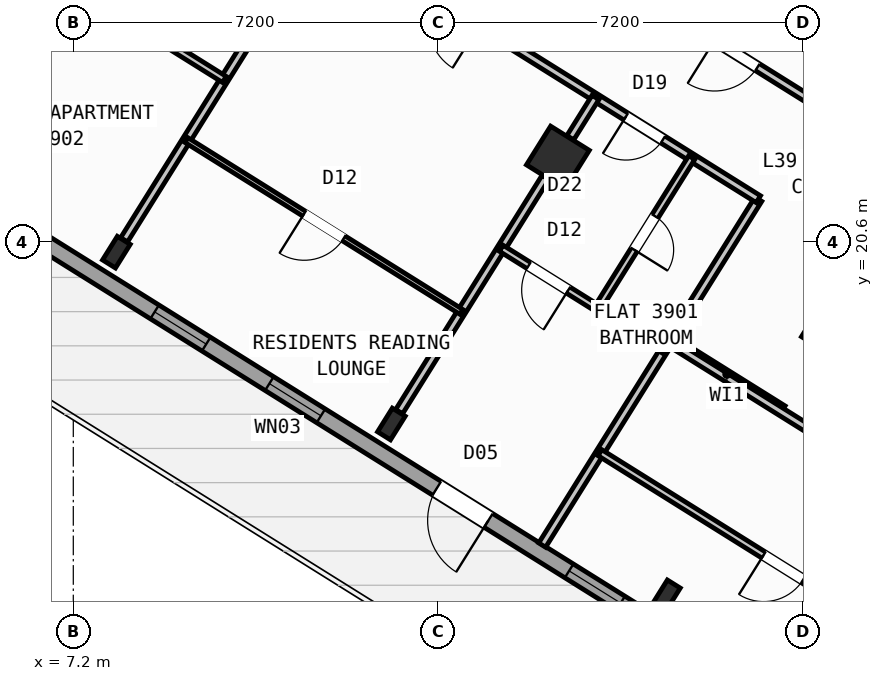
"""IFC4 building model, lengths in metres.
Left out: names, types, materials, properties, quantities, classifications, styles, units other than length and angle.
Written with IfcOpenShell. Run it as: python <this file> out.ifc"""

import sys

from ifc_helpers import new_model, si_unit, direction, frame, frame_2d, origin, origin_2d, place, context, subcontext, project, spatial, rectangle, hollow_rectangle, i_section, extrude, source, transform, mapped, element, fill, save


model = new_model("IFC4")
c1 = context("Model", 3, precision=1e-05, world=origin(), true_north=direction((0.0, 1.0)))
c2 = subcontext(c1, "Body", "Model", "MODEL_VIEW")
j1 = project(units=[si_unit("LENGTHUNIT", "METRE"), si_unit("PLANEANGLEUNIT", "RADIAN")], contexts=[c1])
p1 = place(None, origin())
s1 = spatial("IfcSite", under=j1, at=p1, CompositionType="ELEMENT")
p2 = place(p1, origin())
s2 = spatial("IfcBuilding", under=s1, at=p2, CompositionType="ELEMENT")
p3 = place(p2, frame((0.0, 0.0, 155.1)))
s3 = spatial("IfcBuildingStorey", under=s2, at=p3, CompositionType="ELEMENT", Elevation=155.1)
m1 = source(origin(), c2, "Body", "SweptSolid", [
    extrude(hollow_rectangle(XDim=0.9, YDim=0.9, WallThickness=0.036, at=origin_2d()), origin(), (0.0, 0.0, 1.0), 3.6),
])
p4 = place(p3, frame((22.191, 18.87, 0.0), z_axis=(0.0, 0.0, 1.0), x_axis=(-0.848048096156, 0.529919264233, 0.0)))
e1 = element("IfcColumn", 1, at=p4, inside=s3, PredefinedType="COLUMN", context=c2, shape_type="MappedRepresentation", body=[
    mapped(m1, transform((0.0, 0.0, 0.0), scale=1.0)),
])
m2 = source(origin(), c2, "Body", "SweptSolid", [
    extrude(i_section(OverallWidth=0.3, OverallDepth=0.55, WebThickness=0.015, FlangeThickness=0.029, at=origin_2d()), origin(), (0.0, 0.0, 1.0), 3.6),
])
p5 = place(p3, frame((18.906, 13.612, 0.0), z_axis=(0.0, 0.0, 1.0), x_axis=(-0.848048096156, 0.529919264233, 0.0)))
e2 = element("IfcColumn", 2, at=p5, inside=s3, PredefinedType="COLUMN", context=c2, shape_type="MappedRepresentation", body=[
    mapped(m2, transform((0.0, 0.0, 0.0), scale=1.0)),
])
p6 = place(p3, frame((16.764, 22.261, 0.0), z_axis=(0.0, 0.0, 1.0), x_axis=(-0.848048096156, 0.529919264233, 0.0)))
e3 = element("IfcColumn", 3, at=p6, inside=s3, PredefinedType="COLUMN", context=c2, shape_type="MappedRepresentation", body=[
    mapped(m1, transform((0.0, 0.0, 0.0), scale=1.0)),
])
for number, where, z_axis, x_axis in (
    (4, (13.478, 17.003, 0.0), (0.0, 0.0, 1.0), (-0.848, 0.53, 0.0)),
    (5, (8.051, 20.395, 0.0), (0.0, 0.0, 1.0), (-0.848, 0.53, 0.0)),
):
    element("IfcColumn", number, at=place(p3, frame(where, z_axis=z_axis, x_axis=x_axis)), inside=s3, PredefinedType="COLUMN", context=c2, shape_type="MappedRepresentation", body=[
        mapped(m2, transform((0.0, 0.0, 0.0), scale=1.0)),
    ])
p7 = place(p3, frame((29.268, 6.429, 0.0), z_axis=(0.0, 0.0, 1.0), x_axis=(-0.848049971435, 0.529916263149, 0.0)))
e6 = element("IfcWall", 6, at=p7, inside=s3, PredefinedType="STANDARD", context=c2, shape_type="SweptSolid", body=[
    extrude(rectangle(XDim=31.588, YDim=0.32, at=frame_2d((15.794, 0.0))), origin(), (0.0, 0.0, 1.0), 3.35),
])
p8 = place(p7, frame((16.362, 0.0, 0.0)))
e7 = element("IfcOpeningElement", 7, at=p8, cuts=e6, PredefinedType="OPENING", context=c2, shape_type="SweptSolid", body=[
    extrude(rectangle(XDim=1.2, YDim=2.15, at=frame_2d((0.6, 1.075))), frame((0.0, 0.17, 0.0), z_axis=(0.0, -1.0, 0.0), x_axis=(1.0, 0.0, 0.0)), (0.0, 0.0, 1.0), 0.34),
])
p9 = place(p7, frame((2.989, 0.0, 0.8)))
e8 = element("IfcOpeningElement", 8, at=p9, cuts=e6, PredefinedType="OPENING", context=c2, shape_type="SweptSolid", body=[
    extrude(rectangle(XDim=2.1, YDim=1.55, at=frame_2d((1.05, 0.775))), frame((0.0, 0.17, 0.0), z_axis=(0.0, -1.0, 0.0), x_axis=(1.0, 0.0, 0.0)), (0.0, 0.0, 1.0), 0.34),
])
p10 = place(p7, frame((8.359, 0.0, 0.8)))
e9 = element("IfcOpeningElement", 9, at=p10, cuts=e6, PredefinedType="OPENING", context=c2, shape_type="SweptSolid", body=[
    extrude(rectangle(XDim=2.1, YDim=1.55, at=frame_2d((1.05, 0.775))), frame((0.0, 0.17, 0.0), z_axis=(0.0, -1.0, 0.0), x_axis=(1.0, 0.0, 0.0)), (0.0, 0.0, 1.0), 0.34),
])
p11 = place(p7, frame((13.284, 0.0, 0.95)))
e10 = element("IfcOpeningElement", 10, at=p11, cuts=e6, PredefinedType="OPENING", context=c2, shape_type="SweptSolid", body=[
    extrude(rectangle(XDim=1.2, YDim=1.4, at=frame_2d((0.6, 0.7))), frame((0.0, 0.17, 0.0), z_axis=(0.0, -1.0, 0.0), x_axis=(1.0, 0.0, 0.0)), (0.0, 0.0, 1.0), 0.34),
])
p12 = place(p7, frame((20.259, 0.0, 0.95)))
e11 = element("IfcOpeningElement", 11, at=p12, cuts=e6, PredefinedType="OPENING", context=c2, shape_type="SweptSolid", body=[
    extrude(rectangle(XDim=1.2, YDim=1.4, at=frame_2d((0.6, 0.7))), frame((0.0, 0.17, 0.0), z_axis=(0.0, -1.0, 0.0), x_axis=(1.0, 0.0, 0.0)), (0.0, 0.0, 1.0), 0.34),
])
p13 = place(p7, frame((22.929, 0.0, 0.95)))
e12 = element("IfcOpeningElement", 12, at=p13, cuts=e6, PredefinedType="OPENING", context=c2, shape_type="SweptSolid", body=[
    extrude(rectangle(XDim=1.2, YDim=1.4, at=frame_2d((0.6, 0.7))), frame((0.0, 0.17, 0.0), z_axis=(0.0, -1.0, 0.0), x_axis=(1.0, 0.0, 0.0)), (0.0, 0.0, 1.0), 0.34),
])
p14 = place(p7, frame((27.481, 0.0, 0.8)))
e13 = element("IfcOpeningElement", 13, at=p14, cuts=e6, PredefinedType="OPENING", context=c2, shape_type="SweptSolid", body=[
    extrude(rectangle(XDim=2.1, YDim=1.55, at=frame_2d((1.05, 0.775))), frame((0.0, 0.17, 0.0), z_axis=(0.0, -1.0, 0.0), x_axis=(1.0, 0.0, 0.0)), (0.0, 0.0, 1.0), 0.34),
])
p15 = place(p3, frame((2.415, 23.452, 0.0), z_axis=(0.0, 0.0, 1.0), x_axis=(0.52991049553, 0.848053575387, 0.0)))
e14 = element("IfcWall", 14, at=p15, inside=s3, PredefinedType="STANDARD", context=c2, shape_type="SweptSolid", body=[
    extrude(rectangle(XDim=21.587, YDim=0.32, at=frame_2d((10.794, 0.0))), origin(), (0.0, 0.0, 1.0), 2.775),
])
p16 = place(p15, frame((1.406, 0.0, 0.8)))
e15 = element("IfcOpeningElement", 15, at=p16, cuts=e14, PredefinedType="OPENING", context=c2, shape_type="SweptSolid", body=[
    extrude(rectangle(XDim=2.1, YDim=1.55, at=frame_2d((1.05, 0.775))), frame((0.0, 0.17, 0.0), z_axis=(0.0, -1.0, 0.0), x_axis=(1.0, 0.0, 0.0)), (0.0, 0.0, 1.0), 0.34),
])
p17 = place(p15, frame((10.949, 0.0, 1.0)))
e16 = element("IfcOpeningElement", 16, at=p17, cuts=e14, PredefinedType="OPENING", context=c2, shape_type="SweptSolid", body=[
    extrude(rectangle(XDim=0.9, YDim=1.25, at=frame_2d((0.45, 0.625))), frame((0.0, 0.17, 0.0), z_axis=(0.0, -1.0, 0.0), x_axis=(1.0, 0.0, 0.0)), (0.0, 0.0, 1.0), 0.34),
])
p18 = place(p15, frame((15.369, 0.0, 0.85)))
e17 = element("IfcOpeningElement", 17, at=p18, cuts=e14, PredefinedType="OPENING", context=c2, shape_type="SweptSolid", body=[
    extrude(rectangle(XDim=1.5, YDim=1.5, at=frame_2d((0.75, 0.75))), frame((0.0, 0.17, 0.0), z_axis=(0.0, -1.0, 0.0), x_axis=(1.0, 0.0, 0.0)), (0.0, 0.0, 1.0), 0.34),
])
p19 = place(p15, frame((18.219, 0.0, 0.85)))
e18 = element("IfcOpeningElement", 18, at=p19, cuts=e14, PredefinedType="OPENING", context=c2, shape_type="SweptSolid", body=[
    extrude(rectangle(XDim=1.5, YDim=1.5, at=frame_2d((0.75, 0.75))), frame((0.0, 0.17, 0.0), z_axis=(0.0, -1.0, 0.0), x_axis=(1.0, 0.0, 0.0)), (0.0, 0.0, 1.0), 0.34),
])
p20 = place(p3, frame((21.206, 17.292, 0.0), z_axis=(0.0, 0.0, 1.0), x_axis=(-0.848050851465, 0.529914854792, 0.0)))
e19 = element("IfcWall", 19, at=p20, inside=s3, PredefinedType="PARTITIONING", context=c2, shape_type="SweptSolid", body=[
    extrude(rectangle(XDim=2.61, YDim=0.16, at=frame_2d((1.305, 0.0))), origin(), (0.0, 0.0, 1.0), 3.34),
])
p21 = place(p3, frame((20.719, 21.44, 0.0), z_axis=(0.0, 0.0, 1.0), x_axis=(-0.529906246318, -0.848056230514, 0.0)))
e20 = element("IfcWall", 20, at=p21, inside=s3, PredefinedType="PARTITIONING", context=c2, shape_type="SweptSolid", body=[
    extrude(rectangle(XDim=8.05, YDim=0.16, at=frame_2d((4.025, 0.0))), origin(), (0.0, 0.0, 1.0), 3.34),
])
p22 = place(p3, frame((21.885, 23.306, 0.0), z_axis=(0.0, 0.0, 1.0), x_axis=(-0.848052408131, 0.529912363569, 0.0)))
e21 = element("IfcWall", 21, at=p22, inside=s3, PredefinedType="PARTITIONING", context=c2, shape_type="SweptSolid", body=[
    extrude(rectangle(XDim=16.73, YDim=0.16, at=frame_2d((8.365, 0.0))), origin(), (0.0, 0.0, 1.0), 3.34),
])
p23 = place(p22, frame((1.395, 0.0, 0.0)))
e22 = element("IfcOpeningElement", 22, at=p23, cuts=e21, PredefinedType="OPENING", context=c2, shape_type="SweptSolid", body=[
    extrude(rectangle(XDim=1.0, YDim=2.1, at=frame_2d((0.5, 1.05))), frame((0.0, 0.09, 0.0), z_axis=(0.0, -1.0, 0.0), x_axis=(1.0, 0.0, 0.0)), (0.0, 0.0, 1.0), 0.18),
])
p24 = place(p22, frame((7.82, 0.0, 0.0)))
e23 = element("IfcOpeningElement", 23, at=p24, cuts=e21, PredefinedType="OPENING", context=c2, shape_type="SweptSolid", body=[
    extrude(rectangle(XDim=1.0, YDim=2.1, at=frame_2d((0.5, 1.05))), frame((0.0, 0.09, 0.0), z_axis=(0.0, -1.0, 0.0), x_axis=(1.0, 0.0, 0.0)), (0.0, 0.0, 1.0), 0.18),
])
p25 = place(p22, frame((11.14, 0.0, 0.0)))
e24 = element("IfcOpeningElement", 24, at=p25, cuts=e21, PredefinedType="OPENING", context=c2, shape_type="SweptSolid", body=[
    extrude(rectangle(XDim=1.0, YDim=2.1, at=frame_2d((0.5, 1.05))), frame((0.0, 0.09, 0.0), z_axis=(0.0, -1.0, 0.0), x_axis=(1.0, 0.0, 0.0)), (0.0, 0.0, 1.0), 0.18),
])
p26 = place(p3, frame((20.719, 21.44, 0.0), z_axis=(0.0, 0.0, 1.0), x_axis=(-0.848048310262, 0.529918921593, 0.0)))
e25 = element("IfcWall", 25, at=p26, inside=s3, PredefinedType="PARTITIONING", context=c2, shape_type="SweptSolid", body=[
    extrude(rectangle(XDim=16.73, YDim=0.16, at=frame_2d((8.365, 0.0))), origin(), (0.0, 0.0, 1.0), 3.34),
])
p27 = place(p26, frame((2.22, 0.0, 0.0)))
e26 = element("IfcOpeningElement", 26, at=p27, cuts=e25, PredefinedType="OPENING", context=c2, shape_type="SweptSolid", body=[
    extrude(rectangle(XDim=0.86, YDim=2.05, at=frame_2d((0.43, 1.025))), frame((0.0, 0.09, 0.0), z_axis=(0.0, -1.0, 0.0), x_axis=(1.0, 0.0, 0.0)), (0.0, 0.0, 1.0), 0.18),
])
p28 = place(p26, frame((6.49, 0.0, 0.0)))
e27 = element("IfcOpeningElement", 27, at=p28, cuts=e25, PredefinedType="OPENING", context=c2, shape_type="SweptSolid", body=[
    extrude(rectangle(XDim=1.0, YDim=2.1, at=frame_2d((0.5, 1.05))), frame((0.0, 0.09, 0.0), z_axis=(0.0, -1.0, 0.0), x_axis=(1.0, 0.0, 0.0)), (0.0, 0.0, 1.0), 0.18),
])
p29 = place(p26, frame((14.304, 0.0, 0.0)))
e28 = element("IfcOpeningElement", 28, at=p29, cuts=e25, PredefinedType="OPENING", context=c2, shape_type="SweptSolid", body=[
    extrude(rectangle(XDim=1.0, YDim=2.1, at=frame_2d((0.5, 1.05))), frame((0.0, 0.09, 0.0), z_axis=(0.0, -1.0, 0.0), x_axis=(1.0, 0.0, 0.0)), (0.0, 0.0, 1.0), 0.18),
])
p30 = place(p3, frame((17.506, 23.449, 0.0), z_axis=(0.0, 0.0, 1.0), x_axis=(-0.529835187763, -0.848100627171, 0.0)))
e29 = element("IfcWall", 29, at=p30, inside=s3, PredefinedType="PARTITIONING", context=c2, shape_type="SweptSolid", body=[
    extrude(rectangle(XDim=0.938, YDim=0.16, at=frame_2d((0.469, 0.0))), origin(), (0.0, 0.0, 1.0), 2.775),
])
p31 = place(p3, frame((16.519, 21.87, 0.0), z_axis=(0.0, 0.0, 1.0), x_axis=(-0.529922447305, -0.848046107144, 0.0)))
e30 = element("IfcWall", 30, at=p31, inside=s3, PredefinedType="PARTITIONING", context=c2, shape_type="SweptSolid", body=[
    extrude(rectangle(XDim=5.451, YDim=0.16, at=frame_2d((2.726, 0.0))), origin(), (0.0, 0.0, 1.0), 2.775),
])
p32 = place(p3, frame((18.86, 18.464, 0.0), z_axis=(0.0, 0.0, 1.0), x_axis=(-0.848059820872, 0.529900500304, 0.0)))
e31 = element("IfcWall", 31, at=p32, inside=s3, PredefinedType="PLUMBINGWALL", context=c2, shape_type="SweptSolid", body=[
    extrude(rectangle(XDim=3.79, YDim=0.14, at=frame_2d((1.895, 0.0))), origin(), (0.0, 0.0, 1.0), 3.34),
])
p33 = place(p32, frame((2.23, 0.0, 0.0)))
e32 = element("IfcOpeningElement", 32, at=p33, cuts=e31, PredefinedType="OPENING", context=c2, shape_type="SweptSolid", body=[
    extrude(rectangle(XDim=0.92, YDim=2.08, at=frame_2d((0.46, 1.04))), frame((0.0, 0.08, 0.0), z_axis=(0.0, -1.0, 0.0), x_axis=(1.0, 0.0, 0.0)), (0.0, 0.0, 1.0), 0.16),
])
p34 = place(p3, frame((19.405, 22.261, 0.0), z_axis=(0.0, 0.0, 1.0), x_axis=(-0.529898896701, -0.848060822863, 0.0)))
e33 = element("IfcWall", 33, at=p34, inside=s3, PredefinedType="PLUMBINGWALL", context=c2, shape_type="SweptSolid", body=[
    extrude(rectangle(XDim=3.51, YDim=0.14, at=frame_2d((1.755, 0.0))), origin(), (0.0, 0.0, 1.0), 2.995),
])
p35 = place(p34, frame((1.365, 0.0, 0.0)))
e34 = element("IfcOpeningElement", 34, at=p35, cuts=e33, PredefinedType="OPENING", context=c2, shape_type="SweptSolid", body=[
    extrude(rectangle(XDim=0.78, YDim=2.05, at=frame_2d((0.39, 1.025))), frame((0.0, 0.08, 0.0), z_axis=(0.0, -1.0, 0.0), x_axis=(1.0, 0.0, 0.0)), (0.0, 0.0, 1.0), 0.16),
])
p36 = place(p3, frame((11.091, 25.261, 0.0), z_axis=(0.0, 0.0, 1.0), x_axis=(-0.52994257524, -0.848033529377, 0.0)))
e35 = element("IfcWall", 35, at=p36, inside=s3, PredefinedType="PARTITIONING", context=c2, shape_type="SweptSolid", body=[
    extrude(rectangle(XDim=5.451, YDim=0.16, at=frame_2d((2.726, 0.0))), origin(), (0.0, 0.0, 1.0), 2.775),
])
p37 = place(p3, frame((14.86, 19.215, 0.0), z_axis=(0.0, 0.0, 1.0), x_axis=(-0.848039019877, 0.529933789039, 0.0)))
e36 = element("IfcWall", 36, at=p37, inside=s3, PredefinedType="PARTITIONING", context=c2, shape_type="SweptSolid", body=[
    extrude(rectangle(XDim=6.4, YDim=0.11, at=frame_2d((3.2, 0.0))), origin(), (0.0, 0.0, 1.0), 3.34),
])
p38 = place(p37, frame((2.74, 0.0, 0.0)))
e37 = element("IfcOpeningElement", 37, at=p38, cuts=e36, PredefinedType="OPENING", context=c2, shape_type="SweptSolid", body=[
    extrude(rectangle(XDim=0.92, YDim=2.08, at=frame_2d((0.46, 1.04))), frame((0.0, 0.065, 0.0), z_axis=(0.0, -1.0, 0.0), x_axis=(1.0, 0.0, 0.0)), (0.0, 0.0, 1.0), 0.13),
])
p39 = place(p3, frame((10.181, 23.804, 0.0), z_axis=(0.0, 0.0, 1.0), x_axis=(-0.848065614912, 0.529891227332, 0.0)))
e38 = element("IfcWall", 38, at=p39, inside=s3, PredefinedType="PLUMBINGWALL", context=c2, shape_type="SweptSolid", body=[
    extrude(rectangle(XDim=6.52, YDim=0.14, at=frame_2d((3.26, 0.0))), origin(), (0.0, 0.0, 1.0), 3.34),
])
p40 = place(p39, frame((4.124, 0.0, 0.0)))
e39 = element("IfcOpeningElement", 39, at=p40, cuts=e38, PredefinedType="OPENING", context=c2, shape_type="SweptSolid", body=[
    extrude(rectangle(XDim=0.92, YDim=2.08, at=frame_2d((0.46, 1.04))), frame((0.0, 0.08, 0.0), z_axis=(0.0, -1.0, 0.0), x_axis=(1.0, 0.0, 0.0)), (0.0, 0.0, 1.0), 0.16),
])
p41 = place(p3, frame((32.164, 10.374, 0.0), z_axis=(0.0, 0.0, 1.0), x_axis=(-0.848044107957, 0.529925646633, 0.0)))
e40 = element("IfcWall", 40, at=p41, inside=s3, PredefinedType="PARTITIONING", context=c2, shape_type="SweptSolid", body=[
    extrude(rectangle(XDim=15.57, YDim=0.16, at=frame_2d((7.785, 0.0))), origin(), (0.0, 0.0, 1.0), 3.34),
])
p42 = place(p41, frame((10.83, 0.0, 0.0)))
e41 = element("IfcOpeningElement", 41, at=p42, cuts=e40, PredefinedType="OPENING", context=c2, shape_type="SweptSolid", body=[
    extrude(rectangle(XDim=1.0, YDim=2.1, at=frame_2d((0.5, 1.05))), frame((0.0, 0.09, 0.0), z_axis=(0.0, -1.0, 0.0), x_axis=(1.0, 0.0, 0.0)), (0.0, 0.0, 1.0), 0.18),
])
p43 = place(p3, frame((29.72, 8.859, 0.0), z_axis=(0.0, 0.0, 1.0), x_axis=(-0.848049134363, 0.529917602752, 0.0)))
e42 = element("IfcWall", 42, at=p43, inside=s3, PredefinedType="PLUMBINGWALL", context=c2, shape_type="SweptSolid", body=[
    extrude(rectangle(XDim=14.3, YDim=0.14, at=frame_2d((7.15, 0.0))), origin(), (0.0, 0.0, 1.0), 3.34),
])
p44 = place(p43, frame((9.57, 0.0, 0.0)))
e43 = element("IfcOpeningElement", 43, at=p44, cuts=e42, PredefinedType="OPENING", context=c2, shape_type="SweptSolid", body=[
    extrude(rectangle(XDim=0.92, YDim=2.08, at=frame_2d((0.46, 1.04))), frame((0.0, 0.08, 0.0), z_axis=(0.0, -1.0, 0.0), x_axis=(1.0, 0.0, 0.0)), (0.0, 0.0, 1.0), 0.16),
])
m3 = source(origin(), c2, "Body", "SweptSolid", [
    extrude(rectangle(XDim=1.2, YDim=2.15, at=frame_2d((0.6, 1.075))), frame((0.0, 0.025, 0.0), z_axis=(0.0, -1.0, 0.0), x_axis=(1.0, 0.0, 0.0)), (0.0, 0.0, 1.0), 0.05),
])
p45 = place(p8, origin())
e44 = element("IfcDoor", 44, at=p45, inside=s3, OperationType="SINGLE_SWING_LEFT", PredefinedType="DOOR", context=c2, shape_type="MappedRepresentation", body=[
    mapped(m3, transform((0.0, 0.0, 0.0), scale=1.0)),
])
fill(e7, e44)
m4 = source(origin(), c2, "Body", "SweptSolid", [
    extrude(rectangle(XDim=1.2, YDim=1.4, at=frame_2d((0.6, 0.7))), frame((0.0, 0.03, 0.0), z_axis=(0.0, -1.0, 0.0), x_axis=(1.0, 0.0, 0.0)), (0.0, 0.0, 1.0), 0.06),
])
p46 = place(p11, origin())
e45 = element("IfcWindow", 45, at=p46, inside=s3, PartitioningType="SINGLE_PANEL", PredefinedType="WINDOW", context=c2, shape_type="MappedRepresentation", body=[
    mapped(m4, transform((0.0, 0.0, 0.0), scale=1.0)),
])
fill(e10, e45)
p47 = place(p12, origin())
e46 = element("IfcWindow", 46, at=p47, inside=s3, PartitioningType="SINGLE_PANEL", PredefinedType="WINDOW", context=c2, shape_type="MappedRepresentation", body=[
    mapped(m4, transform((0.0, 0.0, 0.0), scale=1.0)),
])
fill(e11, e46)
p48 = place(p13, origin())
e47 = element("IfcWindow", 47, at=p48, inside=s3, PartitioningType="SINGLE_PANEL", PredefinedType="WINDOW", context=c2, shape_type="MappedRepresentation", body=[
    mapped(m4, transform((0.0, 0.0, 0.0), scale=1.0)),
])
fill(e12, e47)
m5 = source(origin(), c2, "Body", "SweptSolid", [
    extrude(rectangle(XDim=0.86, YDim=2.05, at=frame_2d((0.43, 1.025))), frame((0.0, 0.025, 0.0), z_axis=(0.0, -1.0, 0.0), x_axis=(1.0, 0.0, 0.0)), (0.0, 0.0, 1.0), 0.05),
])
p49 = place(p27, origin())
e48 = element("IfcDoor", 48, at=p49, inside=s3, OperationType="SINGLE_SWING_RIGHT", PredefinedType="DOOR", context=c2, shape_type="MappedRepresentation", body=[
    mapped(m5, transform((0.0, 0.0, 0.0), scale=1.0)),
])
fill(e26, e48)
m6 = source(origin(), c2, "Body", "SweptSolid", [
    extrude(rectangle(XDim=0.92, YDim=2.08, at=frame_2d((0.46, 1.04))), frame((0.0, 0.025, 0.0), z_axis=(0.0, -1.0, 0.0), x_axis=(1.0, 0.0, 0.0)), (0.0, 0.0, 1.0), 0.05),
])
p50 = place(p33, origin())
e49 = element("IfcDoor", 49, at=p50, inside=s3, OperationType="SINGLE_SWING_LEFT", PredefinedType="DOOR", context=c2, shape_type="MappedRepresentation", body=[
    mapped(m6, transform((0.0, 0.0, 0.0), scale=1.0)),
])
fill(e32, e49)
m7 = source(origin(), c2, "Body", "SweptSolid", [
    extrude(rectangle(XDim=0.78, YDim=2.05, at=frame_2d((0.39, 1.025))), frame((0.0, 0.025, 0.0), z_axis=(0.0, -1.0, 0.0), x_axis=(1.0, 0.0, 0.0)), (0.0, 0.0, 1.0), 0.05),
])
p51 = place(p35, origin())
e50 = element("IfcDoor", 50, at=p51, inside=s3, OperationType="SINGLE_SWING_RIGHT", PredefinedType="DOOR", context=c2, shape_type="MappedRepresentation", body=[
    mapped(m7, transform((0.0, 0.0, 0.0), scale=1.0)),
])
fill(e34, e50)
p52 = place(p38, origin())
e51 = element("IfcDoor", 51, at=p52, inside=s3, OperationType="SINGLE_SWING_RIGHT", PredefinedType="DOOR", context=c2, shape_type="MappedRepresentation", body=[
    mapped(m6, transform((0.0, 0.0, 0.0), scale=1.0)),
])
fill(e37, e51)
m8 = source(origin(), c2, "Body", "SweptSolid", [
    extrude(rectangle(XDim=1.0, YDim=2.1, at=frame_2d((0.5, 1.05))), frame((0.0, 0.025, 0.0), z_axis=(0.0, -1.0, 0.0), x_axis=(1.0, 0.0, 0.0)), (0.0, 0.0, 1.0), 0.05),
])
p53 = place(p23, origin())
e52 = element("IfcDoor", 52, at=p53, inside=s3, OperationType="SINGLE_SWING_RIGHT", PredefinedType="DOOR", context=c2, shape_type="MappedRepresentation", body=[
    mapped(m8, transform((0.0, 0.0, 0.0), scale=1.0)),
])
fill(e22, e52)
p54 = place(p44, origin())
e53 = element("IfcDoor", 53, at=p54, inside=s3, OperationType="SINGLE_SWING_RIGHT", PredefinedType="DOOR", context=c2, shape_type="MappedRepresentation", body=[
    mapped(m6, transform((0.0, 0.0, 0.0), scale=1.0)),
])
fill(e43, e53)
save(model, sys.argv[1])
